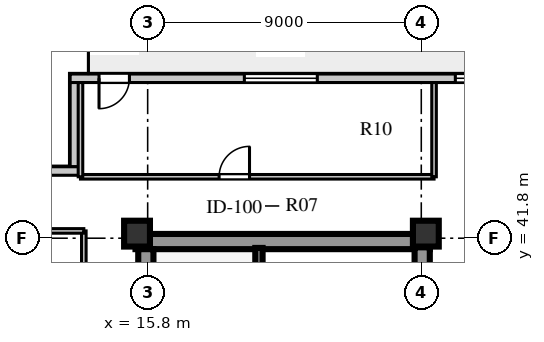
"""IFC4 building model, lengths in metres.
Left out: names, types, materials, properties, quantities, classifications, styles, units other than length and angle.
Written with IfcOpenShell. Run it as: python <this file> out.ifc"""

import sys

from ifc_helpers import new_model, si_unit, direction, frame, frame_2d, origin, origin_2d, place, context, subcontext, project, spatial, rectangle, extrude, element, fill, save


model = new_model("IFC4")
c1 = context("Model", 3, precision=1e-05, world=origin(), true_north=direction((0.0, 1.0)))
c2 = subcontext(c1, "Body", "Model", "MODEL_VIEW")
j1 = project(units=[si_unit("LENGTHUNIT", "METRE"), si_unit("PLANEANGLEUNIT", "RADIAN")], contexts=[c1])
p1 = place(None, origin())
s1 = spatial("IfcSite", under=j1, at=p1, CompositionType="ELEMENT")
p2 = place(p1, origin())
s2 = spatial("IfcBuilding", under=s1, at=p2, CompositionType="ELEMENT")
p3 = place(p2, frame((0.0, 0.0, 127.1)))
s3 = spatial("IfcBuildingStorey", under=s2, at=p3, CompositionType="ELEMENT", Elevation=127.1)
p4 = place(p3, frame((15.4, 41.69, 0.0), z_axis=(0.0, 0.0, 1.0), x_axis=(1.0, 0.0, 0.0)))
e1 = element("IfcWall", 1, at=p4, inside=s3, PredefinedType="SHEAR", context=c2, shape_type="SweptSolid", body=[
    extrude(rectangle(XDim=9.68, YDim=0.5, at=frame_2d((4.84, 0.0))), origin(), (0.0, 0.0, 1.0), 3.6),
])
p5 = place(p3, frame((15.74, 15.81, 0.0), z_axis=(0.0, 0.0, 1.0), x_axis=(0.0, 1.0, 0.0)))
e2 = element("IfcWall", 2, at=p5, inside=s3, PredefinedType="SHEAR", context=c2, shape_type="SweptSolid", body=[
    extrude(rectangle(XDim=25.63, YDim=0.5, at=frame_2d((12.815, 0.0))), origin(), (0.0, 0.0, 1.0), 3.6),
])
p6 = place(p3, frame((24.83, 15.74, 0.0), z_axis=(0.0, 0.0, 1.0), x_axis=(0.0, 1.0, 0.0)))
e3 = element("IfcWall", 3, at=p6, inside=s3, PredefinedType="SHEAR", context=c2, shape_type="SweptSolid", body=[
    extrude(rectangle(XDim=25.76, YDim=0.5, at=frame_2d((12.88, 0.0))), origin(), (0.0, 0.0, 1.0), 3.6),
])
p7 = place(p6, frame((1.61, 0.0, 0.0)))
e4 = element("IfcOpeningElement", 4, at=p7, cuts=e3, PredefinedType="OPENING", context=c2, shape_type="SweptSolid", body=[
    extrude(rectangle(XDim=1.2, YDim=2.1, at=frame_2d((0.6, 1.05))), frame((0.0, 0.26, 0.0), z_axis=(0.0, -1.0, 0.0), x_axis=(1.0, 0.0, 0.0)), (0.0, 0.0, 1.0), 0.52),
])
p8 = place(p6, frame((6.78, 0.0, 0.0)))
e5 = element("IfcOpeningElement", 5, at=p8, cuts=e3, PredefinedType="OPENING", context=c2, shape_type="SweptSolid", body=[
    extrude(rectangle(XDim=0.85, YDim=2.06, at=frame_2d((0.425, 1.03))), frame((0.0, 0.26, 0.0), z_axis=(0.0, -1.0, 0.0), x_axis=(1.0, 0.0, 0.0)), (0.0, 0.0, 1.0), 0.52),
])
p9 = place(p6, frame((12.11, 0.0, 0.0)))
e6 = element("IfcOpeningElement", 6, at=p9, cuts=e3, PredefinedType="OPENING", context=c2, shape_type="SweptSolid", body=[
    extrude(rectangle(XDim=1.5, YDim=2.12, at=frame_2d((0.75, 1.06))), frame((0.0, 0.26, 0.0), z_axis=(0.0, -1.0, 0.0), x_axis=(1.0, 0.0, 0.0)), (0.0, 0.0, 1.0), 0.52),
])
p10 = place(p6, frame((20.11, 0.0, 0.0)))
e7 = element("IfcOpeningElement", 7, at=p10, cuts=e3, PredefinedType="OPENING", context=c2, shape_type="SweptSolid", body=[
    extrude(rectangle(XDim=1.2, YDim=2.12, at=frame_2d((0.6, 1.06))), frame((0.0, 0.26, 0.0), z_axis=(0.0, -1.0, 0.0), x_axis=(1.0, 0.0, 0.0)), (0.0, 0.0, 1.0), 0.52),
])
p11 = place(p6, frame((24.01, 0.0, 0.0)))
e8 = element("IfcOpeningElement", 8, at=p11, cuts=e3, PredefinedType="OPENING", context=c2, shape_type="SweptSolid", body=[
    extrude(rectangle(XDim=0.95, YDim=2.1, at=frame_2d((0.475, 1.05))), frame((0.0, 0.26, 0.0), z_axis=(0.0, -1.0, 0.0), x_axis=(1.0, 0.0, 0.0)), (0.0, 0.0, 1.0), 0.52),
])
for number, where, z_axis, x_axis in (
    (9, (15.45, 41.95, 0.0), (0.0, 0.0, 1.0), (1.0, 0.0, 0.0)),
    (10, (24.95, 41.95, 0.0), (0.0, 0.0, 1.0), (1.0, 0.0, 0.0)),
):
    element("IfcColumn", number, at=place(p3, frame(where, z_axis=z_axis, x_axis=x_axis)), inside=s3, PredefinedType="COLUMN", context=c2, shape_type="SweptSolid", body=[
        extrude(rectangle(XDim=0.85, YDim=0.85, at=origin_2d()), origin(), (0.0, 0.0, 1.0), 3.6),
    ])
p12 = place(p3, frame((45.35, 47.06, 0.0), z_axis=(0.0, 0.0, 1.0), x_axis=(-1.0, 0.0, 0.0)))
e11 = element("IfcWall", 11, at=p12, inside=s3, PredefinedType="STANDARD", context=c2, shape_type="SweptSolid", body=[
    extrude(rectangle(XDim=32.1, YDim=0.28, at=frame_2d((16.05, 0.0))), origin(), (0.0, 0.0, 1.0), 3.6),
])
p13 = place(p12, frame((30.15, 0.0, 0.0)))
e12 = element("IfcOpeningElement", 12, at=p13, cuts=e11, PredefinedType="OPENING", context=c2, shape_type="SweptSolid", body=[
    extrude(rectangle(XDim=1.0, YDim=2.05, at=frame_2d((0.5, 1.025))), frame((0.0, 0.15, 0.0), z_axis=(0.0, -1.0, 0.0), x_axis=(1.0, 0.0, 0.0)), (0.0, 0.0, 1.0), 0.3),
])
p14 = place(p12, frame((23.97, 0.0, 0.8)))
e13 = element("IfcOpeningElement", 13, at=p14, cuts=e11, PredefinedType="OPENING", context=c2, shape_type="SweptSolid", body=[
    extrude(rectangle(XDim=2.4, YDim=2.05, at=frame_2d((1.2, 1.025))), frame((0.0, 0.15, 0.0), z_axis=(0.0, -1.0, 0.0), x_axis=(1.0, 0.0, 0.0)), (0.0, 0.0, 1.0), 0.3),
])
p15 = place(p12, frame((18.23, 0.0, 0.8)))
e14 = element("IfcOpeningElement", 14, at=p15, cuts=e11, PredefinedType="OPENING", context=c2, shape_type="SweptSolid", body=[
    extrude(rectangle(XDim=1.2, YDim=1.75, at=frame_2d((0.6, 0.875))), frame((0.0, 0.15, 0.0), z_axis=(0.0, -1.0, 0.0), x_axis=(1.0, 0.0, 0.0)), (0.0, 0.0, 1.0), 0.3),
])
p16 = place(p12, frame((15.865, 0.0, 0.8)))
e15 = element("IfcOpeningElement", 15, at=p16, cuts=e11, PredefinedType="OPENING", context=c2, shape_type="SweptSolid", body=[
    extrude(rectangle(XDim=1.2, YDim=1.75, at=frame_2d((0.6, 0.875))), frame((0.0, 0.15, 0.0), z_axis=(0.0, -1.0, 0.0), x_axis=(1.0, 0.0, 0.0)), (0.0, 0.0, 1.0), 0.3),
])
p17 = place(p12, frame((13.255, 0.0, 0.8)))
e16 = element("IfcOpeningElement", 16, at=p17, cuts=e11, PredefinedType="OPENING", context=c2, shape_type="SweptSolid", body=[
    extrude(rectangle(XDim=1.65, YDim=1.95, at=frame_2d((0.825, 0.975))), frame((0.0, 0.15, 0.0), z_axis=(0.0, -1.0, 0.0), x_axis=(1.0, 0.0, 0.0)), (0.0, 0.0, 1.0), 0.3),
])
p18 = place(p12, frame((11.095, 0.0, 0.8)))
e17 = element("IfcOpeningElement", 17, at=p18, cuts=e11, PredefinedType="OPENING", context=c2, shape_type="SweptSolid", body=[
    extrude(rectangle(XDim=1.2, YDim=1.75, at=frame_2d((0.6, 0.875))), frame((0.0, 0.15, 0.0), z_axis=(0.0, -1.0, 0.0), x_axis=(1.0, 0.0, 0.0)), (0.0, 0.0, 1.0), 0.3),
])
p19 = place(p12, frame((6.455, 0.0, 0.8)))
e18 = element("IfcOpeningElement", 18, at=p19, cuts=e11, PredefinedType="OPENING", context=c2, shape_type="SweptSolid", body=[
    extrude(rectangle(XDim=2.25, YDim=2.0, at=frame_2d((1.125, 1.0))), frame((0.0, 0.15, 0.0), z_axis=(0.0, -1.0, 0.0), x_axis=(1.0, 0.0, 0.0)), (0.0, 0.0, 1.0), 0.3),
])
p20 = place(p12, frame((1.42, 0.0, 0.8)))
e19 = element("IfcOpeningElement", 19, at=p20, cuts=e11, PredefinedType="OPENING", context=c2, shape_type="SweptSolid", body=[
    extrude(rectangle(XDim=1.8, YDim=2.0, at=frame_2d((0.9, 1.0))), frame((0.0, 0.15, 0.0), z_axis=(0.0, -1.0, 0.0), x_axis=(1.0, 0.0, 0.0)), (0.0, 0.0, 1.0), 0.3),
])
p21 = place(p3, frame((13.39, 46.92, 0.0), z_axis=(0.0, 0.0, 1.0), x_axis=(0.0, -1.0, 0.0)))
e20 = element("IfcWall", 20, at=p21, inside=s3, PredefinedType="STANDARD", context=c2, shape_type="SweptSolid", body=[
    extrude(rectangle(XDim=2.77, YDim=0.28, at=frame_2d((1.385, 0.0))), origin(), (0.0, 0.0, 1.0), 3.6),
])
p22 = place(p3, frame((13.53, 44.01, 0.0), z_axis=(0.0, 0.0, 1.0), x_axis=(-1.0, 0.0, 0.0)))
e21 = element("IfcWall", 21, at=p22, inside=s3, PredefinedType="STANDARD", context=c2, shape_type="SweptSolid", body=[
    extrude(rectangle(XDim=3.33, YDim=0.28, at=frame_2d((1.665, 0.0))), origin(), (0.0, 0.0, 1.0), 3.6),
])
p23 = place(p3, frame((19.46, 33.3, 0.0), z_axis=(0.0, 0.0, 1.0), x_axis=(0.0, 1.0, 0.0)))
e22 = element("IfcWall", 22, at=p23, inside=s3, PredefinedType="SHEAR", context=c2, shape_type="SweptSolid", body=[
    extrude(rectangle(XDim=8.18, YDim=0.24, at=frame_2d((4.09, 0.0))), origin(), (0.0, 0.0, 1.0), 3.85),
])
p24 = place(p23, frame((0.65, 0.0, 0.0)))
e23 = element("IfcOpeningElement", 23, at=p24, cuts=e22, PredefinedType="OPENING", context=c2, shape_type="SweptSolid", body=[
    extrude(rectangle(XDim=1.1, YDim=2.1, at=frame_2d((0.55, 1.05))), frame((0.0, 0.13, 0.0), z_axis=(0.0, -1.0, 0.0), x_axis=(1.0, 0.0, 0.0)), (0.0, 0.0, 1.0), 0.26),
])
p25 = place(p3, frame((13.7, 15.16, 0.0), z_axis=(0.0, 0.0, 1.0), x_axis=(0.0, 1.0, 0.0)))
e24 = element("IfcWall", 24, at=p25, inside=s3, PredefinedType="PARTITIONING", context=c2, shape_type="SweptSolid", body=[
    extrude(rectangle(XDim=26.88, YDim=0.15, at=frame_2d((13.44, 0.0))), origin(), (0.0, 0.0, 1.0), 3.6),
])
p26 = place(p25, frame((0.91, 0.0, 0.0)))
e25 = element("IfcOpeningElement", 25, at=p26, cuts=e24, PredefinedType="OPENING", context=c2, shape_type="SweptSolid", body=[
    extrude(rectangle(XDim=0.95, YDim=2.1, at=frame_2d((0.475, 1.05))), frame((0.0, 0.085, 0.0), z_axis=(0.0, -1.0, 0.0), x_axis=(1.0, 0.0, 0.0)), (0.0, 0.0, 1.0), 0.17),
])
p27 = place(p25, frame((9.69, 0.0, 0.0)))
e26 = element("IfcOpeningElement", 26, at=p27, cuts=e24, PredefinedType="OPENING", context=c2, shape_type="SweptSolid", body=[
    extrude(rectangle(XDim=0.95, YDim=2.1, at=frame_2d((0.475, 1.05))), frame((0.0, 0.085, 0.0), z_axis=(0.0, -1.0, 0.0), x_axis=(1.0, 0.0, 0.0)), (0.0, 0.0, 1.0), 0.17),
])
p28 = place(p25, frame((18.49, 0.0, 0.0)))
e27 = element("IfcOpeningElement", 27, at=p28, cuts=e24, PredefinedType="OPENING", context=c2, shape_type="SweptSolid", body=[
    extrude(rectangle(XDim=0.95, YDim=2.1, at=frame_2d((0.475, 1.05))), frame((0.0, 0.085, 0.0), z_axis=(0.0, -1.0, 0.0), x_axis=(1.0, 0.0, 0.0)), (0.0, 0.0, 1.0), 0.17),
])
p29 = place(p3, frame((10.48, 42.04, 0.0), z_axis=(0.0, 0.0, 1.0), x_axis=(1.0, 0.0, 0.0)))
e28 = element("IfcWall", 28, at=p29, inside=s3, PredefinedType="PARTITIONING", context=c2, shape_type="SweptSolid", body=[
    extrude(rectangle(XDim=3.22, YDim=0.15, at=frame_2d((1.61, 0.0))), origin(), (0.0, 0.0, 1.0), 3.1),
])
p30 = place(p3, frame((13.59, 43.82, 0.0), z_axis=(0.0, 0.0, 1.0), x_axis=(1.0, 0.0, 0.0)))
e29 = element("IfcWall", 29, at=p30, inside=s3, PredefinedType="PARTITIONING", context=c2, shape_type="SweptSolid", body=[
    extrude(rectangle(XDim=11.63, YDim=0.15, at=frame_2d((5.815, 0.0))), origin(), (0.0, 0.0, 1.0), 3.6),
])
p31 = place(p30, frame((4.56, 0.0, 0.0)))
e30 = element("IfcOpeningElement", 30, at=p31, cuts=e29, PredefinedType="OPENING", context=c2, shape_type="SweptSolid", body=[
    extrude(rectangle(XDim=1.0, YDim=2.08, at=frame_2d((0.5, 1.04))), frame((0.0, 0.085, 0.0), z_axis=(0.0, -1.0, 0.0), x_axis=(1.0, 0.0, 0.0)), (0.0, 0.0, 1.0), 0.17),
])
p32 = place(p3, frame((13.59, 43.82, 0.0), z_axis=(0.0, 0.0, 1.0), x_axis=(0.0, 1.0, 0.0)))
e31 = element("IfcWall", 31, at=p32, inside=s3, PredefinedType="PARTITIONING", context=c2, shape_type="SweptSolid", body=[
    extrude(rectangle(XDim=3.1, YDim=0.15, at=frame_2d((1.55, 0.0))), origin(), (0.0, 0.0, 1.0), 3.6),
])
p33 = place(p3, frame((25.22, 43.82, 0.0), z_axis=(0.0, 0.0, 1.0), x_axis=(0.0, 1.0, 0.0)))
e32 = element("IfcWall", 32, at=p33, inside=s3, PredefinedType="PARTITIONING", context=c2, shape_type="SweptSolid", body=[
    extrude(rectangle(XDim=3.1, YDim=0.15, at=frame_2d((1.55, 0.0))), origin(), (0.0, 0.0, 1.0), 3.1),
])
p34 = place(p13, frame((1.0, 0.0, 0.0), z_axis=(0.0, 0.0, 1.0), x_axis=(-1.0, 0.0, 0.0)))
e33 = element("IfcDoor", 33, at=p34, inside=s3, OperationType="SINGLE_SWING_LEFT", PredefinedType="DOOR", context=c2, shape_type="SweptSolid", body=[
    extrude(rectangle(XDim=1.0, YDim=2.05, at=frame_2d((0.5, 1.025))), frame((0.0, 0.025, 0.0), z_axis=(0.0, -1.0, 0.0), x_axis=(1.0, 0.0, 0.0)), (0.0, 0.0, 1.0), 0.05),
])
fill(e12, e33)
p35 = place(p14, origin())
e34 = element("IfcWindow", 34, at=p35, inside=s3, PartitioningType="SINGLE_PANEL", PredefinedType="WINDOW", context=c2, shape_type="SweptSolid", body=[
    extrude(rectangle(XDim=2.4, YDim=2.05, at=frame_2d((1.2, 1.025))), frame((0.0, 0.03, 0.0), z_axis=(0.0, -1.0, 0.0), x_axis=(1.0, 0.0, 0.0)), (0.0, 0.0, 1.0), 0.06),
])
fill(e13, e34)
p36 = place(p15, origin())
e35 = element("IfcWindow", 35, at=p36, inside=s3, PartitioningType="SINGLE_PANEL", PredefinedType="WINDOW", context=c2, shape_type="SweptSolid", body=[
    extrude(rectangle(XDim=1.2, YDim=1.75, at=frame_2d((0.6, 0.875))), frame((0.0, 0.03, 0.0), z_axis=(0.0, -1.0, 0.0), x_axis=(1.0, 0.0, 0.0)), (0.0, 0.0, 1.0), 0.06),
])
fill(e14, e35)
p37 = place(p31, origin())
e36 = element("IfcDoor", 36, at=p37, inside=s3, OperationType="SINGLE_SWING_RIGHT", PredefinedType="DOOR", context=c2, shape_type="SweptSolid", body=[
    extrude(rectangle(XDim=1.0, YDim=2.08, at=frame_2d((0.5, 1.04))), frame((0.0, 0.025, 0.0), z_axis=(0.0, -1.0, 0.0), x_axis=(1.0, 0.0, 0.0)), (0.0, 0.0, 1.0), 0.05),
])
fill(e30, e36)
save(model, sys.argv[1])
